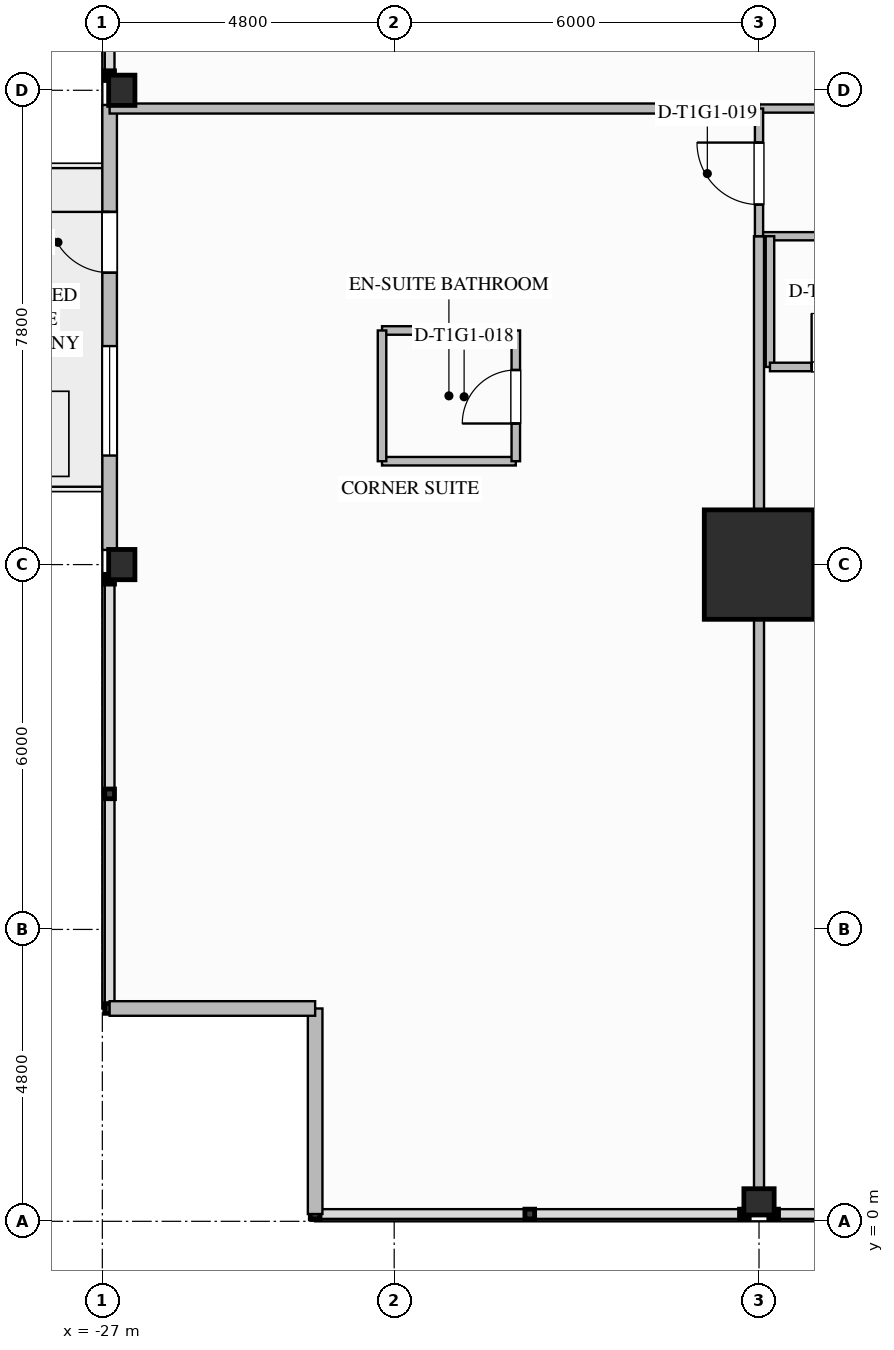
"""IFC4 building model, lengths in metres.
Left out: names, types, materials, properties, quantities, classifications, styles, units other than length and angle.
Written with IfcOpenShell. Run it as: python <this file> out.ifc"""

import sys

from ifc_helpers import new_model, si_unit, direction, frame, frame_2d, origin, origin_2d, place, context, subcontext, project, spatial, rectangle, i_section, extrude, element, fill, save


model = new_model("IFC4")
c1 = context("Model", 3, precision=1e-05, world=origin(), true_north=direction((0.0, 1.0)))
c2 = subcontext(c1, "Body", "Model", "MODEL_VIEW")
j1 = project(units=[si_unit("LENGTHUNIT", "METRE"), si_unit("PLANEANGLEUNIT", "RADIAN")], contexts=[c1])
p1 = place(None, origin())
s1 = spatial("IfcSite", under=j1, at=p1, CompositionType="ELEMENT")
p2 = place(p1, origin())
s2 = spatial("IfcBuilding", under=s1, at=p2, CompositionType="ELEMENT")
p3 = place(p2, frame((0.0, 0.0, 33.2)))
s3 = spatial("IfcBuildingStorey", under=s2, at=p3, CompositionType="ELEMENT", Elevation=33.2)
p4 = place(p3, frame((-16.2, 10.8, 0.0), z_axis=(0.0, 0.0, 1.0), x_axis=(1.0, 0.0, 0.0)))
e1 = element("IfcColumn", 1, at=p4, inside=s3, PredefinedType="COLUMN", context=c2, shape_type="SweptSolid", body=[
    extrude(rectangle(XDim=1.8, YDim=1.8, at=origin_2d()), origin(), (0.0, 0.0, 1.0), 3.5),
])
for number, where, z_axis, x_axis in (
    (2, (-26.68, 10.8, -0.26), (0.0, 0.0, 1.0), (1.0, 0.0, 0.0)),
    (3, (-26.68, 18.6, -0.26), (0.0, 0.0, 1.0), (1.0, 0.0, 0.0)),
    (4, (-16.2, 0.32, -0.26), (0.0, 0.0, 1.0), (0.0, 1.0, 0.0)),
):
    element("IfcColumn", number, at=place(p3, frame(where, z_axis=z_axis, x_axis=x_axis)), inside=s3, PredefinedType="COLUMN", context=c2, shape_type="SweptSolid", body=[
        extrude(i_section(OverallWidth=0.432, OverallDepth=0.498, WebThickness=0.056, FlangeThickness=0.089, FilletRadius=0.03, at=origin_2d()), origin(), (0.0, 0.0, 1.0), 3.757),
    ])
p5 = place(p3, frame((-26.88, 11.041, 0.0), z_axis=(0.0, 0.0, 1.0), x_axis=(0.0, 1.0, 0.0)))
e5 = element("IfcWall", 5, at=p5, inside=s3, PredefinedType="STANDARD", context=c2, shape_type="SweptSolid", body=[
    extrude(rectangle(XDim=7.318, YDim=0.24, at=frame_2d((3.659, 0.0))), origin(), (0.0, 0.0, 1.0), 2.629),
])
p6 = place(p5, frame((4.559, 0.0, 0.0)))
e6 = element("IfcOpeningElement", 6, at=p6, cuts=e5, PredefinedType="OPENING", context=c2, shape_type="SweptSolid", body=[
    extrude(rectangle(XDim=1.0, YDim=2.2, at=frame_2d((0.5, 1.1))), frame((0.0, 0.13, 0.0), z_axis=(0.0, -1.0, 0.0), x_axis=(1.0, 0.0, 0.0)), (0.0, 0.0, 1.0), 0.26),
])
p7 = place(p5, frame((1.552, 0.0, 0.75)))
e7 = element("IfcOpeningElement", 7, at=p7, cuts=e5, PredefinedType="OPENING", context=c2, shape_type="SweptSolid", body=[
    extrude(rectangle(XDim=1.8, YDim=1.779, at=frame_2d((0.9, 0.89))), frame((0.0, 0.13, 0.0), z_axis=(0.0, -1.0, 0.0), x_axis=(1.0, 0.0, 0.0)), (0.0, 0.0, 1.0), 0.26),
])
for number, where, z_axis, x_axis in (
    (8, (-23.5, 0.12, 0.0), (0.0, 0.0, 1.0), (0.0, 1.0, 0.0)),
    (9, (-23.5, 3.5, 0.0), (0.0, 0.0, 1.0), (-1.0, 0.0, 0.0)),
):
    element("IfcWall", number, at=place(p3, frame(where, z_axis=z_axis, x_axis=x_axis)), inside=s3, PredefinedType="STANDARD", context=c2, shape_type="SweptSolid", body=[
        extrude(rectangle(XDim=3.38, YDim=0.24, at=frame_2d((1.69, 0.0))), origin(), (0.0, 0.0, 1.0), 3.24),
    ])
p8 = place(p3, frame((-16.2, 16.2, 0.0), z_axis=(0.0, 0.0, 1.0), x_axis=(1.0, 0.0, 0.0)))
e10 = element("IfcWall", 10, at=p8, inside=s3, PredefinedType="PARTITIONING", context=c2, shape_type="SweptSolid", body=[
    extrude(rectangle(XDim=32.4, YDim=0.135, at=frame_2d((16.2, 0.0))), origin(), (0.0, 0.0, 1.0), 3.24),
])
p9 = place(p8, frame((3.285, 0.0, 0.0)))
e11 = element("IfcOpeningElement", 11, at=p9, cuts=e10, PredefinedType="OPENING", context=c2, shape_type="SweptSolid", body=[
    extrude(rectangle(XDim=1.26, YDim=2.2, at=frame_2d((0.63, 1.1))), frame((0.0, 0.077, 0.0), z_axis=(0.0, -1.0, 0.0), x_axis=(1.0, 0.0, 0.0)), (0.0, 0.0, 1.0), 0.155),
])
p10 = place(p8, frame((8.59, 0.0, 0.0)))
e12 = element("IfcOpeningElement", 12, at=p10, cuts=e10, PredefinedType="OPENING", context=c2, shape_type="SweptSolid", body=[
    extrude(rectangle(XDim=0.96, YDim=2.15, at=frame_2d((0.48, 1.075))), frame((0.0, 0.077, 0.0), z_axis=(0.0, -1.0, 0.0), x_axis=(1.0, 0.0, 0.0)), (0.0, 0.0, 1.0), 0.155),
])
p11 = place(p8, frame((13.84, 0.0, 0.0)))
e13 = element("IfcOpeningElement", 13, at=p11, cuts=e10, PredefinedType="OPENING", context=c2, shape_type="SweptSolid", body=[
    extrude(rectangle(XDim=1.26, YDim=2.2, at=frame_2d((0.63, 1.1))), frame((0.0, 0.077, 0.0), z_axis=(0.0, -1.0, 0.0), x_axis=(1.0, 0.0, 0.0)), (0.0, 0.0, 1.0), 0.155),
])
p12 = place(p8, frame((19.73, 0.0, 0.0)))
e14 = element("IfcOpeningElement", 14, at=p12, cuts=e10, PredefinedType="OPENING", context=c2, shape_type="SweptSolid", body=[
    extrude(rectangle(XDim=1.26, YDim=2.2, at=frame_2d((0.63, 1.1))), frame((0.0, 0.077, 0.0), z_axis=(0.0, -1.0, 0.0), x_axis=(1.0, 0.0, 0.0)), (0.0, 0.0, 1.0), 0.155),
])
p13 = place(p8, frame((25.281, 0.0, 0.0)))
e15 = element("IfcOpeningElement", 15, at=p13, cuts=e10, PredefinedType="OPENING", context=c2, shape_type="SweptSolid", body=[
    extrude(rectangle(XDim=0.96, YDim=2.15, at=frame_2d((0.48, 1.075))), frame((0.0, 0.077, 0.0), z_axis=(0.0, -1.0, 0.0), x_axis=(1.0, 0.0, 0.0)), (0.0, 0.0, 1.0), 0.155),
])
p14 = place(p8, frame((30.285, 0.0, 0.0)))
e16 = element("IfcOpeningElement", 16, at=p14, cuts=e10, PredefinedType="OPENING", context=c2, shape_type="SweptSolid", body=[
    extrude(rectangle(XDim=1.26, YDim=2.2, at=frame_2d((0.63, 1.1))), frame((0.0, 0.077, 0.0), z_axis=(0.0, -1.0, 0.0), x_axis=(1.0, 0.0, 0.0)), (0.0, 0.0, 1.0), 0.155),
])
p15 = place(p3, frame((-16.2, 18.3, 0.0), z_axis=(0.0, 0.0, 1.0), x_axis=(1.0, 0.0, 0.0)))
e17 = element("IfcWall", 17, at=p15, inside=s3, PredefinedType="PARTITIONING", context=c2, shape_type="SweptSolid", body=[
    extrude(rectangle(XDim=5.4, YDim=0.135, at=frame_2d((2.7, 0.0))), origin(), (0.0, 0.0, 1.0), 3.24),
])
p16 = place(p3, frame((-16.2, 0.12, 0.0), z_axis=(0.0, 0.0, 1.0), x_axis=(0.0, 1.0, 0.0)))
e18 = element("IfcWall", 18, at=p16, inside=s3, PredefinedType="PARTITIONING", context=c2, shape_type="SweptSolid", body=[
    extrude(rectangle(XDim=16.08, YDim=0.165, at=frame_2d((8.04, 0.0))), origin(), (0.0, 0.0, 1.0), 2.298),
])
p17 = place(p3, frame((-26.88, 18.3, 0.0), z_axis=(0.0, 0.0, 1.0), x_axis=(1.0, 0.0, 0.0)))
e19 = element("IfcWall", 19, at=p17, inside=s3, PredefinedType="PARTITIONING", context=c2, shape_type="SweptSolid", body=[
    extrude(rectangle(XDim=10.68, YDim=0.165, at=frame_2d((5.34, 0.0))), origin(), (0.0, 0.0, 1.0), 2.298),
])
p18 = place(p3, frame((-16.2, 16.2, 0.0), z_axis=(0.0, 0.0, 1.0), x_axis=(0.0, 1.0, 0.0)))
e20 = element("IfcWall", 20, at=p18, inside=s3, PredefinedType="PARTITIONING", context=c2, shape_type="SweptSolid", body=[
    extrude(rectangle(XDim=2.1, YDim=0.135, at=frame_2d((1.05, 0.0))), origin(), (0.0, 0.0, 1.0), 2.298),
])
p19 = place(p18, frame((0.52, 0.0, 0.0)))
e21 = element("IfcOpeningElement", 21, at=p19, cuts=e20, PredefinedType="OPENING", context=c2, shape_type="SweptSolid", body=[
    extrude(rectangle(XDim=1.02, YDim=2.15, at=frame_2d((0.51, 1.075))), frame((0.0, 0.077, 0.0), z_axis=(0.0, -1.0, 0.0), x_axis=(1.0, 0.0, 0.0)), (0.0, 0.0, 1.0), 0.155),
])
for number, where, z_axis, x_axis in (
    (22, (-22.4, 12.5, 0.0), (0.0, 0.0, 1.0), (1.0, 0.0, 0.0)),
    (23, (-22.4, 14.65, 0.0), (0.0, 0.0, 1.0), (1.0, 0.0, 0.0)),
):
    element("IfcWall", number, at=place(p3, frame(where, z_axis=z_axis, x_axis=x_axis)), inside=s3, PredefinedType="PLUMBINGWALL", context=c2, shape_type="SweptSolid", body=[
        extrude(rectangle(XDim=2.2, YDim=0.14, at=frame_2d((1.1, 0.0))), origin(), (0.0, 0.0, 1.0), 3.24),
    ])
p20 = place(p3, frame((-22.4, 12.5, 0.0), z_axis=(0.0, 0.0, 1.0), x_axis=(0.0, 1.0, 0.0)))
e24 = element("IfcWall", 24, at=p20, inside=s3, PredefinedType="PLUMBINGWALL", context=c2, shape_type="SweptSolid", body=[
    extrude(rectangle(XDim=2.15, YDim=0.14, at=frame_2d((1.075, 0.0))), origin(), (0.0, 0.0, 1.0), 3.24),
])
p21 = place(p3, frame((-20.2, 12.5, 0.0), z_axis=(0.0, 0.0, 1.0), x_axis=(0.0, 1.0, 0.0)))
e25 = element("IfcWall", 25, at=p21, inside=s3, PredefinedType="PLUMBINGWALL", context=c2, shape_type="SweptSolid", body=[
    extrude(rectangle(XDim=2.15, YDim=0.14, at=frame_2d((1.075, 0.0))), origin(), (0.0, 0.0, 1.0), 3.24),
])
p22 = place(p21, frame((0.62, 0.0, 0.0)))
e26 = element("IfcOpeningElement", 26, at=p22, cuts=e25, PredefinedType="OPENING", context=c2, shape_type="SweptSolid", body=[
    extrude(rectangle(XDim=0.88, YDim=2.1, at=frame_2d((0.44, 1.05))), frame((0.0, 0.08, 0.0), z_axis=(0.0, -1.0, 0.0), x_axis=(1.0, 0.0, 0.0)), (0.0, 0.0, 1.0), 0.16),
])
p23 = place(p3, frame((-16.02, 16.2, 0.0), z_axis=(0.0, 0.0, 1.0), x_axis=(0.0, -1.0, 0.0)))
e27 = element("IfcWall", 27, at=p23, inside=s3, PredefinedType="PLUMBINGWALL", context=c2, shape_type="SweptSolid", body=[
    extrude(rectangle(XDim=2.15, YDim=0.14, at=frame_2d((1.075, 0.0))), origin(), (0.0, 0.0, 1.0), 2.298),
])
p24 = place(p3, frame((-16.02, 14.05, 0.0), z_axis=(0.0, 0.0, 1.0), x_axis=(1.0, 0.0, 0.0)))
e28 = element("IfcWall", 28, at=p24, inside=s3, PredefinedType="PLUMBINGWALL", context=c2, shape_type="SweptSolid", body=[
    extrude(rectangle(XDim=2.25, YDim=0.14, at=frame_2d((1.125, 0.0))), origin(), (0.0, 0.0, 1.0), 3.24),
])
p25 = place(p24, frame((0.685, 0.0, 0.0)))
e29 = element("IfcOpeningElement", 29, at=p25, cuts=e28, PredefinedType="OPENING", context=c2, shape_type="SweptSolid", body=[
    extrude(rectangle(XDim=0.88, YDim=2.1, at=frame_2d((0.44, 1.05))), frame((0.0, 0.08, 0.0), z_axis=(0.0, -1.0, 0.0), x_axis=(1.0, 0.0, 0.0)), (0.0, 0.0, 1.0), 0.16),
])
p26 = place(p6, origin())
e30 = element("IfcDoor", 30, at=p26, inside=s3, OperationType="SINGLE_SWING_RIGHT", PredefinedType="DOOR", context=c2, shape_type="SweptSolid", body=[
    extrude(rectangle(XDim=1.0, YDim=2.2, at=frame_2d((0.5, 1.1))), frame((0.0, 0.025, 0.0), z_axis=(0.0, -1.0, 0.0), x_axis=(1.0, 0.0, 0.0)), (0.0, 0.0, 1.0), 0.05),
])
fill(e6, e30)
p27 = place(p7, origin())
e31 = element("IfcWindow", 31, at=p27, inside=s3, PartitioningType="SINGLE_PANEL", PredefinedType="WINDOW", context=c2, shape_type="SweptSolid", body=[
    extrude(rectangle(XDim=1.8, YDim=1.779, at=frame_2d((0.9, 0.89))), frame((0.0, 0.03, 0.0), z_axis=(0.0, -1.0, 0.0), x_axis=(1.0, 0.0, 0.0)), (0.0, 0.0, 1.0), 0.06),
])
fill(e7, e31)
p28 = place(p22, origin())
e32 = element("IfcDoor", 32, at=p28, inside=s3, OperationType="SINGLE_SWING_LEFT", PredefinedType="DOOR", context=c2, shape_type="SweptSolid", body=[
    extrude(rectangle(XDim=0.88, YDim=2.1, at=frame_2d((0.44, 1.05))), frame((0.0, 0.025, 0.0), z_axis=(0.0, -1.0, 0.0), x_axis=(1.0, 0.0, 0.0)), (0.0, 0.0, 1.0), 0.05),
])
fill(e26, e32)
p29 = place(p19, origin())
e33 = element("IfcDoor", 33, at=p29, inside=s3, OperationType="SINGLE_SWING_RIGHT", PredefinedType="DOOR", context=c2, shape_type="SweptSolid", body=[
    extrude(rectangle(XDim=1.02, YDim=2.15, at=frame_2d((0.51, 1.075))), frame((0.0, 0.025, 0.0), z_axis=(0.0, -1.0, 0.0), x_axis=(1.0, 0.0, 0.0)), (0.0, 0.0, 1.0), 0.05),
])
fill(e21, e33)
p30 = place(p25, origin())
e34 = element("IfcDoor", 34, at=p30, inside=s3, OperationType="SINGLE_SWING_LEFT", PredefinedType="DOOR", context=c2, shape_type="SweptSolid", body=[
    extrude(rectangle(XDim=0.88, YDim=2.1, at=frame_2d((0.44, 1.05))), frame((0.0, 0.025, 0.0), z_axis=(0.0, -1.0, 0.0), x_axis=(1.0, 0.0, 0.0)), (0.0, 0.0, 1.0), 0.05),
])
fill(e29, e34)
save(model, sys.argv[1])
